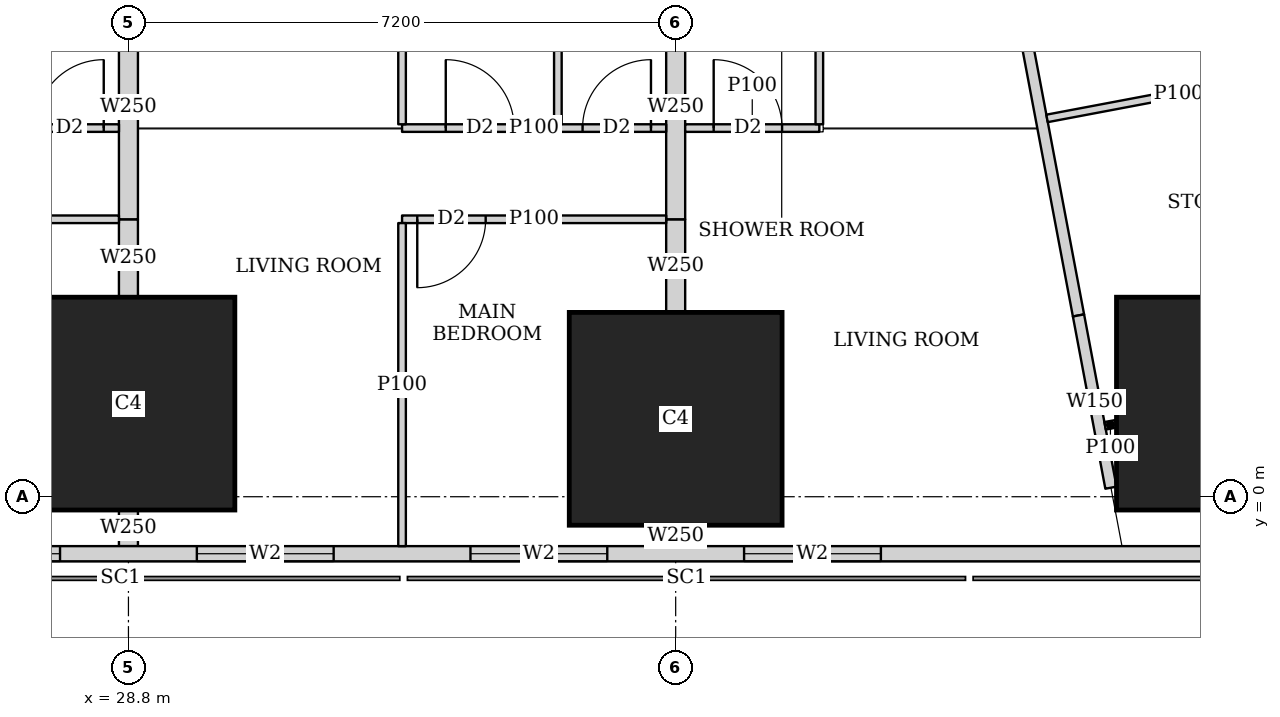
"""IFC4 building model, lengths in metres.
Left out: names, types, materials, properties, quantities, classifications, styles, units other than length and angle.
Written with IfcOpenShell. Run it as: python <this file> out.ifc"""

import sys

from ifc_helpers import new_model, si_unit, direction, frame, frame_2d, origin, origin_2d, place, context, subcontext, project, spatial, rectangle, extrude, element, fill, save


model = new_model("IFC4")
c1 = context("Model", 3, precision=1e-05, world=origin(), true_north=direction((0.0, 1.0)))
c2 = subcontext(c1, "Body", "Model", "MODEL_VIEW")
j1 = project(units=[si_unit("LENGTHUNIT", "METRE"), si_unit("PLANEANGLEUNIT", "RADIAN")], contexts=[c1])
p1 = place(None, origin())
s1 = spatial("IfcSite", under=j1, at=p1, CompositionType="ELEMENT")
p2 = place(p1, origin())
s2 = spatial("IfcBuilding", under=s1, at=p2, CompositionType="ELEMENT")
p3 = place(p2, frame((0.0, 0.0, 42.5)))
s3 = spatial("IfcBuildingStorey", under=s2, at=p3, CompositionType="ELEMENT", Elevation=42.5)
for number, where, z_axis, x_axis in (
    (1, (28.8, 1.225, 0.0), (0.0, 0.0, 1.0), (1.0, 0.0, 0.0)),
    (2, (36.0, 1.025, 0.0), (0.0, 0.0, 1.0), (1.0, 0.0, 0.0)),
    (3, (43.2, 1.225, 0.0), (0.0, 0.0, 1.0), (1.0, 0.0, 0.0)),
):
    element("IfcColumn", number, at=place(p3, frame(where, z_axis=z_axis, x_axis=x_axis)), inside=s3, PredefinedType="COLUMN", context=c2, shape_type="SweptSolid", body=[
        extrude(rectangle(XDim=2.8, YDim=2.8, at=origin_2d()), origin(), (0.0, 0.0, 1.0), 3.75),
    ])
p4 = place(p3, frame((2.163, -0.75, 0.0), z_axis=(0.0, 0.0, 1.0), x_axis=(1.0, 0.0, 0.0)))
e4 = element("IfcWall", 4, at=p4, inside=s3, PredefinedType="SOLIDWALL", context=c2, shape_type="SweptSolid", body=[
    extrude(rectangle(XDim=45.628, YDim=0.2, at=frame_2d((22.814, 0.0))), origin(), (0.0, 0.0, 1.0), 3.5),
])
p5 = place(p4, frame((9.537, 0.0, 0.9)))
e5 = element("IfcOpeningElement", 5, at=p5, cuts=e4, PredefinedType="OPENING", context=c2, shape_type="SweptSolid", body=[
    extrude(rectangle(XDim=1.8, YDim=1.5, at=frame_2d((0.9, 0.75))), frame((0.0, 0.11, 0.0), z_axis=(0.0, -1.0, 0.0), x_axis=(1.0, 0.0, 0.0)), (0.0, 0.0, 1.0), 0.22),
])
p6 = place(p4, frame((13.137, 0.0, 0.9)))
e6 = element("IfcOpeningElement", 6, at=p6, cuts=e4, PredefinedType="OPENING", context=c2, shape_type="SweptSolid", body=[
    extrude(rectangle(XDim=1.8, YDim=1.5, at=frame_2d((0.9, 0.75))), frame((0.0, 0.11, 0.0), z_axis=(0.0, -1.0, 0.0), x_axis=(1.0, 0.0, 0.0)), (0.0, 0.0, 1.0), 0.22),
])
p7 = place(p4, frame((16.737, 0.0, 0.9)))
e7 = element("IfcOpeningElement", 7, at=p7, cuts=e4, PredefinedType="OPENING", context=c2, shape_type="SweptSolid", body=[
    extrude(rectangle(XDim=1.8, YDim=1.5, at=frame_2d((0.9, 0.75))), frame((0.0, 0.11, 0.0), z_axis=(0.0, -1.0, 0.0), x_axis=(1.0, 0.0, 0.0)), (0.0, 0.0, 1.0), 0.22),
])
p8 = place(p4, frame((20.337, 0.0, 0.9)))
e8 = element("IfcOpeningElement", 8, at=p8, cuts=e4, PredefinedType="OPENING", context=c2, shape_type="SweptSolid", body=[
    extrude(rectangle(XDim=1.8, YDim=1.5, at=frame_2d((0.9, 0.75))), frame((0.0, 0.11, 0.0), z_axis=(0.0, -1.0, 0.0), x_axis=(1.0, 0.0, 0.0)), (0.0, 0.0, 1.0), 0.22),
])
p9 = place(p4, frame((23.937, 0.0, 0.9)))
e9 = element("IfcOpeningElement", 9, at=p9, cuts=e4, PredefinedType="OPENING", context=c2, shape_type="SweptSolid", body=[
    extrude(rectangle(XDim=1.8, YDim=1.5, at=frame_2d((0.9, 0.75))), frame((0.0, 0.11, 0.0), z_axis=(0.0, -1.0, 0.0), x_axis=(1.0, 0.0, 0.0)), (0.0, 0.0, 1.0), 0.22),
])
p10 = place(p4, frame((27.537, 0.0, 0.9)))
e10 = element("IfcOpeningElement", 10, at=p10, cuts=e4, PredefinedType="OPENING", context=c2, shape_type="SweptSolid", body=[
    extrude(rectangle(XDim=1.8, YDim=1.5, at=frame_2d((0.9, 0.75))), frame((0.0, 0.11, 0.0), z_axis=(0.0, -1.0, 0.0), x_axis=(1.0, 0.0, 0.0)), (0.0, 0.0, 1.0), 0.22),
])
p11 = place(p4, frame((31.137, 0.0, 0.9)))
e11 = element("IfcOpeningElement", 11, at=p11, cuts=e4, PredefinedType="OPENING", context=c2, shape_type="SweptSolid", body=[
    extrude(rectangle(XDim=1.8, YDim=1.5, at=frame_2d((0.9, 0.75))), frame((0.0, 0.11, 0.0), z_axis=(0.0, -1.0, 0.0), x_axis=(1.0, 0.0, 0.0)), (0.0, 0.0, 1.0), 0.22),
])
p12 = place(p4, frame((34.737, 0.0, 0.9)))
e12 = element("IfcOpeningElement", 12, at=p12, cuts=e4, PredefinedType="OPENING", context=c2, shape_type="SweptSolid", body=[
    extrude(rectangle(XDim=1.8, YDim=1.5, at=frame_2d((0.9, 0.75))), frame((0.0, 0.11, 0.0), z_axis=(0.0, -1.0, 0.0), x_axis=(1.0, 0.0, 0.0)), (0.0, 0.0, 1.0), 0.22),
])
p13 = place(p3, frame((50.653, 2.703, 0.0), z_axis=(0.0, 0.0, 1.0), x_axis=(-0.185612026696, 0.982623109613, 0.0)))
e13 = element("IfcWall", 13, at=p13, inside=s3, PredefinedType="SOLIDWALL", context=c2, shape_type="SweptSolid", body=[
    extrude(rectangle(XDim=41.393, YDim=0.2, at=frame_2d((20.697, 0.0))), origin(), (0.0, 0.0, 1.0), 3.5),
])
p14 = place(p13, frame((1.633, 0.0, 0.9)))
e14 = element("IfcOpeningElement", 14, at=p14, cuts=e13, PredefinedType="OPENING", context=c2, shape_type="SweptSolid", body=[
    extrude(rectangle(XDim=1.8, YDim=1.5, at=frame_2d((0.9, 0.75))), frame((0.0, 0.11, 0.0), z_axis=(0.0, -1.0, 0.0), x_axis=(1.0, 0.0, 0.0)), (0.0, 0.0, 1.0), 0.22),
])
p15 = place(p13, frame((6.032, 0.0, 0.9)))
e15 = element("IfcOpeningElement", 15, at=p15, cuts=e13, PredefinedType="OPENING", context=c2, shape_type="SweptSolid", body=[
    extrude(rectangle(XDim=1.8, YDim=1.5, at=frame_2d((0.9, 0.75))), frame((0.0, 0.11, 0.0), z_axis=(0.0, -1.0, 0.0), x_axis=(1.0, 0.0, 0.0)), (0.0, 0.0, 1.0), 0.22),
])
p16 = place(p13, frame((9.848, 0.0, 0.9)))
e16 = element("IfcOpeningElement", 16, at=p16, cuts=e13, PredefinedType="OPENING", context=c2, shape_type="SweptSolid", body=[
    extrude(rectangle(XDim=1.8, YDim=1.5, at=frame_2d((0.9, 0.75))), frame((0.0, 0.11, 0.0), z_axis=(0.0, -1.0, 0.0), x_axis=(1.0, 0.0, 0.0)), (0.0, 0.0, 1.0), 0.22),
])
p17 = place(p13, frame((17.481, 0.0, 0.9)))
e17 = element("IfcOpeningElement", 17, at=p17, cuts=e13, PredefinedType="OPENING", context=c2, shape_type="SweptSolid", body=[
    extrude(rectangle(XDim=1.8, YDim=1.5, at=frame_2d((0.9, 0.75))), frame((0.0, 0.11, 0.0), z_axis=(0.0, -1.0, 0.0), x_axis=(1.0, 0.0, 0.0)), (0.0, 0.0, 1.0), 0.22),
])
p18 = place(p13, frame((21.297, 0.0, 0.9)))
e18 = element("IfcOpeningElement", 18, at=p18, cuts=e13, PredefinedType="OPENING", context=c2, shape_type="SweptSolid", body=[
    extrude(rectangle(XDim=1.8, YDim=1.5, at=frame_2d((0.9, 0.75))), frame((0.0, 0.11, 0.0), z_axis=(0.0, -1.0, 0.0), x_axis=(1.0, 0.0, 0.0)), (0.0, 0.0, 1.0), 0.22),
])
p19 = place(p13, frame((25.113, 0.0, 0.9)))
e19 = element("IfcOpeningElement", 19, at=p19, cuts=e13, PredefinedType="OPENING", context=c2, shape_type="SweptSolid", body=[
    extrude(rectangle(XDim=1.8, YDim=1.5, at=frame_2d((0.9, 0.75))), frame((0.0, 0.11, 0.0), z_axis=(0.0, -1.0, 0.0), x_axis=(1.0, 0.0, 0.0)), (0.0, 0.0, 1.0), 0.22),
])
p20 = place(p13, frame((28.93, 0.0, 0.9)))
e20 = element("IfcOpeningElement", 20, at=p20, cuts=e13, PredefinedType="OPENING", context=c2, shape_type="SweptSolid", body=[
    extrude(rectangle(XDim=1.8, YDim=1.5, at=frame_2d((0.9, 0.75))), frame((0.0, 0.11, 0.0), z_axis=(0.0, -1.0, 0.0), x_axis=(1.0, 0.0, 0.0)), (0.0, 0.0, 1.0), 0.22),
])
p21 = place(p13, frame((32.746, 0.0, 0.9)))
e21 = element("IfcOpeningElement", 21, at=p21, cuts=e13, PredefinedType="OPENING", context=c2, shape_type="SweptSolid", body=[
    extrude(rectangle(XDim=1.8, YDim=1.5, at=frame_2d((0.9, 0.75))), frame((0.0, 0.11, 0.0), z_axis=(0.0, -1.0, 0.0), x_axis=(1.0, 0.0, 0.0)), (0.0, 0.0, 1.0), 0.22),
])
p22 = place(p13, frame((36.481, 0.0, 0.9)))
e22 = element("IfcOpeningElement", 22, at=p22, cuts=e13, PredefinedType="OPENING", context=c2, shape_type="SweptSolid", body=[
    extrude(rectangle(XDim=1.8, YDim=1.5, at=frame_2d((0.9, 0.75))), frame((0.0, 0.11, 0.0), z_axis=(0.0, -1.0, 0.0), x_axis=(1.0, 0.0, 0.0)), (0.0, 0.0, 1.0), 0.22),
])
p23 = place(p3, frame((33.68, 42.723, 0.0), z_axis=(0.0, 0.0, 1.0), x_axis=(0.185624129307, -0.98262082342, 0.0)))
e23 = element("IfcWall", 23, at=p23, inside=s3, PredefinedType="SOLIDWALL", context=c2, shape_type="SweptSolid", body=[
    extrude(rectangle(XDim=41.051, YDim=0.15, at=frame_2d((20.526, 0.0))), origin(), (0.0, 0.0, 1.0), 2.5),
])
p24 = place(p23, frame((7.73, 0.0, 0.0)))
e24 = element("IfcOpeningElement", 24, at=p24, cuts=e23, PredefinedType="OPENING", context=c2, shape_type="SweptSolid", body=[
    extrude(rectangle(XDim=1.0, YDim=2.1, at=frame_2d((0.5, 1.05))), frame((0.0, 0.085, 0.0), z_axis=(0.0, -1.0, 0.0), x_axis=(1.0, 0.0, 0.0)), (0.0, 0.0, 1.0), 0.17),
])
p25 = place(p23, frame((12.307, 0.0, 0.0)))
e25 = element("IfcOpeningElement", 25, at=p25, cuts=e23, PredefinedType="OPENING", context=c2, shape_type="SweptSolid", body=[
    extrude(rectangle(XDim=1.0, YDim=2.1, at=frame_2d((0.5, 1.05))), frame((0.0, 0.085, 0.0), z_axis=(0.0, -1.0, 0.0), x_axis=(1.0, 0.0, 0.0)), (0.0, 0.0, 1.0), 0.17),
])
p26 = place(p23, frame((19.938, 0.0, 0.0)))
e26 = element("IfcOpeningElement", 26, at=p26, cuts=e23, PredefinedType="OPENING", context=c2, shape_type="SweptSolid", body=[
    extrude(rectangle(XDim=1.0, YDim=2.1, at=frame_2d((0.5, 1.05))), frame((0.0, 0.085, 0.0), z_axis=(0.0, -1.0, 0.0), x_axis=(1.0, 0.0, 0.0)), (0.0, 0.0, 1.0), 0.17),
])
p27 = place(p23, frame((32.193, 0.0, 0.0)))
e27 = element("IfcOpeningElement", 27, at=p27, cuts=e23, PredefinedType="OPENING", context=c2, shape_type="SweptSolid", body=[
    extrude(rectangle(XDim=1.0, YDim=2.1, at=frame_2d((0.5, 1.05))), frame((0.0, 0.085, 0.0), z_axis=(0.0, -1.0, 0.0), x_axis=(1.0, 0.0, 0.0)), (0.0, 0.0, 1.0), 0.17),
])
p28 = place(p3, frame((41.3, 2.385, 0.0), z_axis=(0.0, 0.0, 1.0), x_axis=(0.185170596553, -0.982706390624, 0.0)))
e28 = element("IfcWall", 28, at=p28, inside=s3, PredefinedType="SOLIDWALL", context=c2, shape_type="SweptSolid", body=[
    extrude(rectangle(XDim=2.306, YDim=0.15, at=frame_2d((1.153, 0.0))), origin(), (0.0, 0.0, 1.0), 2.05),
])
p29 = place(p3, frame((28.675, 3.65, 0.0), z_axis=(0.0, 0.0, 1.0), x_axis=(-1.0, 0.0, 0.0)))
e29 = element("IfcWall", 29, at=p29, inside=s3, PredefinedType="PARTITIONING", context=c2, shape_type="SweptSolid", body=[
    extrude(rectangle(XDim=3.475, YDim=0.1, at=frame_2d((1.738, 0.0))), origin(), (0.0, 0.0, 1.0), 3.5),
])
p30 = place(p29, frame((2.375, 0.0, 0.0)))
e30 = element("IfcOpeningElement", 30, at=p30, cuts=e29, PredefinedType="OPENING", context=c2, shape_type="SweptSolid", body=[
    extrude(rectangle(XDim=0.9, YDim=2.1, at=frame_2d((0.45, 1.05))), frame((0.0, 0.06, 0.0), z_axis=(0.0, -1.0, 0.0), x_axis=(1.0, 0.0, 0.0)), (0.0, 0.0, 1.0), 0.12),
])
p31 = place(p3, frame((28.675, 4.85, 0.0), z_axis=(0.0, 0.0, 1.0), x_axis=(-1.0, 0.0, 0.0)))
e31 = element("IfcWall", 31, at=p31, inside=s3, PredefinedType="PARTITIONING", context=c2, shape_type="SweptSolid", body=[
    extrude(rectangle(XDim=3.475, YDim=0.1, at=frame_2d((1.738, 0.0))), origin(), (0.0, 0.0, 1.0), 3.5),
])
p32 = place(p31, frame((2.0, 0.0, 0.0)))
e32 = element("IfcOpeningElement", 32, at=p32, cuts=e31, PredefinedType="OPENING", context=c2, shape_type="SweptSolid", body=[
    extrude(rectangle(XDim=0.9, YDim=2.1, at=frame_2d((0.45, 1.05))), frame((0.0, 0.06, 0.0), z_axis=(0.0, -1.0, 0.0), x_axis=(1.0, 0.0, 0.0)), (0.0, 0.0, 1.0), 0.12),
])
p33 = place(p31, frame((0.2, 0.0, 0.0)))
e33 = element("IfcOpeningElement", 33, at=p33, cuts=e31, PredefinedType="OPENING", context=c2, shape_type="SweptSolid", body=[
    extrude(rectangle(XDim=0.9, YDim=2.1, at=frame_2d((0.45, 1.05))), frame((0.0, 0.06, 0.0), z_axis=(0.0, -1.0, 0.0), x_axis=(1.0, 0.0, 0.0)), (0.0, 0.0, 1.0), 0.12),
])
p34 = place(p3, frame((35.875, 3.65, 0.0), z_axis=(0.0, 0.0, 1.0), x_axis=(-1.0, 0.0, 0.0)))
e34 = element("IfcWall", 34, at=p34, inside=s3, PredefinedType="PARTITIONING", context=c2, shape_type="SweptSolid", body=[
    extrude(rectangle(XDim=3.475, YDim=0.1, at=frame_2d((1.738, 0.0))), origin(), (0.0, 0.0, 1.0), 3.5),
])
p35 = place(p34, frame((2.375, 0.0, 0.0)))
e35 = element("IfcOpeningElement", 35, at=p35, cuts=e34, PredefinedType="OPENING", context=c2, shape_type="SweptSolid", body=[
    extrude(rectangle(XDim=0.9, YDim=2.1, at=frame_2d((0.45, 1.05))), frame((0.0, 0.06, 0.0), z_axis=(0.0, -1.0, 0.0), x_axis=(1.0, 0.0, 0.0)), (0.0, 0.0, 1.0), 0.12),
])
p36 = place(p3, frame((35.875, 4.85, 0.0), z_axis=(0.0, 0.0, 1.0), x_axis=(-1.0, 0.0, 0.0)))
e36 = element("IfcWall", 36, at=p36, inside=s3, PredefinedType="PARTITIONING", context=c2, shape_type="SweptSolid", body=[
    extrude(rectangle(XDim=3.475, YDim=0.1, at=frame_2d((1.738, 0.0))), origin(), (0.0, 0.0, 1.0), 3.5),
])
p37 = place(p36, frame((2.0, 0.0, 0.0)))
e37 = element("IfcOpeningElement", 37, at=p37, cuts=e36, PredefinedType="OPENING", context=c2, shape_type="SweptSolid", body=[
    extrude(rectangle(XDim=0.9, YDim=2.1, at=frame_2d((0.45, 1.05))), frame((0.0, 0.06, 0.0), z_axis=(0.0, -1.0, 0.0), x_axis=(1.0, 0.0, 0.0)), (0.0, 0.0, 1.0), 0.12),
])
p38 = place(p36, frame((0.2, 0.0, 0.0)))
e38 = element("IfcOpeningElement", 38, at=p38, cuts=e36, PredefinedType="OPENING", context=c2, shape_type="SweptSolid", body=[
    extrude(rectangle(XDim=0.9, YDim=2.1, at=frame_2d((0.45, 1.05))), frame((0.0, 0.06, 0.0), z_axis=(0.0, -1.0, 0.0), x_axis=(1.0, 0.0, 0.0)), (0.0, 0.0, 1.0), 0.12),
])
p39 = place(p3, frame((32.4, -0.65, 0.0), z_axis=(0.0, 0.0, 1.0), x_axis=(0.0, 1.0, 0.0)))
e39 = element("IfcWall", 39, at=p39, inside=s3, PredefinedType="PARTITIONING", context=c2, shape_type="SweptSolid", body=[
    extrude(rectangle(XDim=4.25, YDim=0.1, at=frame_2d((2.125, 0.0))), origin(), (0.0, 0.0, 1.0), 2.05),
])
for number, where, z_axis, x_axis in (
    (40, (32.4, 4.9, 0.0), (0.0, 0.0, 1.0), (0.0, 1.0, 0.0)),
    (41, (34.45, 4.9, 0.0), (0.0, 0.0, 1.0), (0.0, 1.0, 0.0)),
):
    element("IfcWall", number, at=place(p3, frame(where, z_axis=z_axis, x_axis=x_axis)), inside=s3, PredefinedType="PARTITIONING", context=c2, shape_type="SweptSolid", body=[
        extrude(rectangle(XDim=3.525, YDim=0.1, at=frame_2d((1.763, 0.0))), origin(), (0.0, 0.0, 1.0), 3.5),
    ])
p40 = place(p3, frame((28.8, -0.65, 0.0), z_axis=(0.0, 0.0, 1.0), x_axis=(0.0, 1.0, 0.0)))
e42 = element("IfcWall", 42, at=p40, inside=s3, PredefinedType="SOLIDWALL", context=c2, shape_type="SweptSolid", body=[
    extrude(rectangle(XDim=0.474, YDim=0.25, at=frame_2d((0.237, 0.0))), origin(), (0.0, 0.0, 1.0), 3.5),
])
p41 = place(p3, frame((28.8, 2.626, 0.0), z_axis=(0.0, 0.0, 1.0), x_axis=(0.0, 1.0, 0.0)))
e43 = element("IfcWall", 43, at=p41, inside=s3, PredefinedType="SOLIDWALL", context=c2, shape_type="SweptSolid", body=[
    extrude(rectangle(XDim=1.024, YDim=0.25, at=frame_2d((0.512, 0.0))), origin(), (0.0, 0.0, 1.0), 3.5),
])
p42 = place(p3, frame((28.8, 3.65, 0.0), z_axis=(0.0, 0.0, 1.0), x_axis=(0.0, 1.0, 0.0)))
e44 = element("IfcWall", 44, at=p42, inside=s3, PredefinedType="SOLIDWALL", context=c2, shape_type="SweptSolid", body=[
    extrude(rectangle(XDim=2.949, YDim=0.25, at=frame_2d((1.475, 0.0))), origin(), (0.0, 0.0, 1.0), 3.5),
])
p43 = place(p3, frame((37.89, 4.85, 0.0), z_axis=(0.0, 0.0, 1.0), x_axis=(-1.0, 0.0, 0.0)))
e45 = element("IfcWall", 45, at=p43, inside=s3, PredefinedType="PARTITIONING", context=c2, shape_type="SweptSolid", body=[
    extrude(rectangle(XDim=1.765, YDim=0.1, at=frame_2d((0.882, 0.0))), origin(), (0.0, 0.0, 1.0), 3.5),
])
p44 = place(p43, frame((0.49, 0.0, 0.0)))
e46 = element("IfcOpeningElement", 46, at=p44, cuts=e45, PredefinedType="OPENING", context=c2, shape_type="SweptSolid", body=[
    extrude(rectangle(XDim=0.9, YDim=2.1, at=frame_2d((0.45, 1.05))), frame((0.0, 0.06, 0.0), z_axis=(0.0, -1.0, 0.0), x_axis=(1.0, 0.0, 0.0)), (0.0, 0.0, 1.0), 0.12),
])
p45 = place(p3, frame((37.89, 4.9, 0.0), z_axis=(0.0, 0.0, 1.0), x_axis=(0.0, 1.0, 0.0)))
e47 = element("IfcWall", 47, at=p45, inside=s3, PredefinedType="PARTITIONING", context=c2, shape_type="SweptSolid", body=[
    extrude(rectangle(XDim=3.525, YDim=0.1, at=frame_2d((1.763, 0.0))), origin(), (0.0, 0.0, 1.0), 3.5),
])
p46 = place(p3, frame((36.0, -0.65, 0.0), z_axis=(0.0, 0.0, 1.0), x_axis=(0.0, 1.0, 0.0)))
e48 = element("IfcWall", 48, at=p46, inside=s3, PredefinedType="SOLIDWALL", context=c2, shape_type="SweptSolid", body=[
    extrude(rectangle(XDim=0.274, YDim=0.25, at=frame_2d((0.137, 0.0))), origin(), (0.0, 0.0, 1.0), 3.5),
])
p47 = place(p3, frame((36.0, 2.426, 0.0), z_axis=(0.0, 0.0, 1.0), x_axis=(0.0, 1.0, 0.0)))
e49 = element("IfcWall", 49, at=p47, inside=s3, PredefinedType="SOLIDWALL", context=c2, shape_type="SweptSolid", body=[
    extrude(rectangle(XDim=1.224, YDim=0.25, at=frame_2d((0.612, 0.0))), origin(), (0.0, 0.0, 1.0), 3.5),
])
p48 = place(p3, frame((36.0, 3.65, 0.0), z_axis=(0.0, 0.0, 1.0), x_axis=(0.0, 1.0, 0.0)))
e50 = element("IfcWall", 50, at=p48, inside=s3, PredefinedType="SOLIDWALL", context=c2, shape_type="SweptSolid", body=[
    extrude(rectangle(XDim=2.949, YDim=0.25, at=frame_2d((1.475, 0.0))), origin(), (0.0, 0.0, 1.0), 3.5),
])
p49 = place(p3, frame((41.79, 0.959, 0.0), z_axis=(0.0, 0.0, 1.0), x_axis=(-0.983372768072, -0.181598455428, 0.0)))
e51 = element("IfcWall", 51, at=p49, inside=s3, PredefinedType="PARTITIONING", context=c2, shape_type="SweptSolid", body=[
    extrude(rectangle(XDim=0.143, YDim=0.1, at=frame_2d((0.071, 0.0))), origin(), (0.0, 0.0, 1.0), 2.05),
])
p50 = place(p3, frame((44.349, 5.631, 0.0), z_axis=(0.0, 0.0, 1.0), x_axis=(-0.982629014545, -0.18558076348, 0.0)))
e52 = element("IfcWall", 52, at=p50, inside=s3, PredefinedType="PARTITIONING", context=c2, shape_type="SweptSolid", body=[
    extrude(rectangle(XDim=3.524, YDim=0.1, at=frame_2d((1.762, 0.0))), origin(), (0.0, 0.0, 1.0), 3.5),
])
p51 = place(p9, origin())
e53 = element("IfcWindow", 53, at=p51, inside=s3, PartitioningType="SINGLE_PANEL", PredefinedType="WINDOW", context=c2, shape_type="SweptSolid", body=[
    extrude(rectangle(XDim=1.8, YDim=1.5, at=frame_2d((0.9, 0.75))), frame((0.0, 0.03, 0.0), z_axis=(0.0, -1.0, 0.0), x_axis=(1.0, 0.0, 0.0)), (0.0, 0.0, 1.0), 0.06),
])
fill(e9, e53)
p52 = place(p10, origin())
e54 = element("IfcWindow", 54, at=p52, inside=s3, PartitioningType="SINGLE_PANEL", PredefinedType="WINDOW", context=c2, shape_type="SweptSolid", body=[
    extrude(rectangle(XDim=1.8, YDim=1.5, at=frame_2d((0.9, 0.75))), frame((0.0, 0.03, 0.0), z_axis=(0.0, -1.0, 0.0), x_axis=(1.0, 0.0, 0.0)), (0.0, 0.0, 1.0), 0.06),
])
fill(e10, e54)
p53 = place(p11, origin())
e55 = element("IfcWindow", 55, at=p53, inside=s3, PartitioningType="SINGLE_PANEL", PredefinedType="WINDOW", context=c2, shape_type="SweptSolid", body=[
    extrude(rectangle(XDim=1.8, YDim=1.5, at=frame_2d((0.9, 0.75))), frame((0.0, 0.03, 0.0), z_axis=(0.0, -1.0, 0.0), x_axis=(1.0, 0.0, 0.0)), (0.0, 0.0, 1.0), 0.06),
])
fill(e11, e55)
p54 = place(p12, origin())
e56 = element("IfcWindow", 56, at=p54, inside=s3, PartitioningType="SINGLE_PANEL", PredefinedType="WINDOW", context=c2, shape_type="SweptSolid", body=[
    extrude(rectangle(XDim=1.8, YDim=1.5, at=frame_2d((0.9, 0.75))), frame((0.0, 0.03, 0.0), z_axis=(0.0, -1.0, 0.0), x_axis=(1.0, 0.0, 0.0)), (0.0, 0.0, 1.0), 0.06),
])
fill(e12, e56)
p55 = place(p33, origin())
e57 = element("IfcDoor", 57, at=p55, inside=s3, OperationType="SINGLE_SWING_RIGHT", PredefinedType="DOOR", context=c2, shape_type="SweptSolid", body=[
    extrude(rectangle(XDim=0.9, YDim=2.1, at=frame_2d((0.45, 1.05))), frame((0.0, 0.025, 0.0), z_axis=(0.0, -1.0, 0.0), x_axis=(1.0, 0.0, 0.0)), (0.0, 0.0, 1.0), 0.05),
])
fill(e33, e57)
p56 = place(p35, origin())
e58 = element("IfcDoor", 58, at=p56, inside=s3, OperationType="SINGLE_SWING_RIGHT", PredefinedType="DOOR", context=c2, shape_type="SweptSolid", body=[
    extrude(rectangle(XDim=0.9, YDim=2.1, at=frame_2d((0.45, 1.05))), frame((0.0, 0.025, 0.0), z_axis=(0.0, -1.0, 0.0), x_axis=(1.0, 0.0, 0.0)), (0.0, 0.0, 1.0), 0.05),
])
fill(e35, e58)
p57 = place(p37, origin())
e59 = element("IfcDoor", 59, at=p57, inside=s3, OperationType="SINGLE_SWING_LEFT", PredefinedType="DOOR", context=c2, shape_type="SweptSolid", body=[
    extrude(rectangle(XDim=0.9, YDim=2.1, at=frame_2d((0.45, 1.05))), frame((0.0, 0.025, 0.0), z_axis=(0.0, -1.0, 0.0), x_axis=(1.0, 0.0, 0.0)), (0.0, 0.0, 1.0), 0.05),
])
fill(e37, e59)
p58 = place(p38, origin())
e60 = element("IfcDoor", 60, at=p58, inside=s3, OperationType="SINGLE_SWING_RIGHT", PredefinedType="DOOR", context=c2, shape_type="SweptSolid", body=[
    extrude(rectangle(XDim=0.9, YDim=2.1, at=frame_2d((0.45, 1.05))), frame((0.0, 0.025, 0.0), z_axis=(0.0, -1.0, 0.0), x_axis=(1.0, 0.0, 0.0)), (0.0, 0.0, 1.0), 0.05),
])
fill(e38, e60)
p59 = place(p44, origin())
e61 = element("IfcDoor", 61, at=p59, inside=s3, OperationType="SINGLE_SWING_LEFT", PredefinedType="DOOR", context=c2, shape_type="SweptSolid", body=[
    extrude(rectangle(XDim=0.9, YDim=2.1, at=frame_2d((0.45, 1.05))), frame((0.0, 0.025, 0.0), z_axis=(0.0, -1.0, 0.0), x_axis=(1.0, 0.0, 0.0)), (0.0, 0.0, 1.0), 0.05),
])
fill(e46, e61)
save(model, sys.argv[1])
